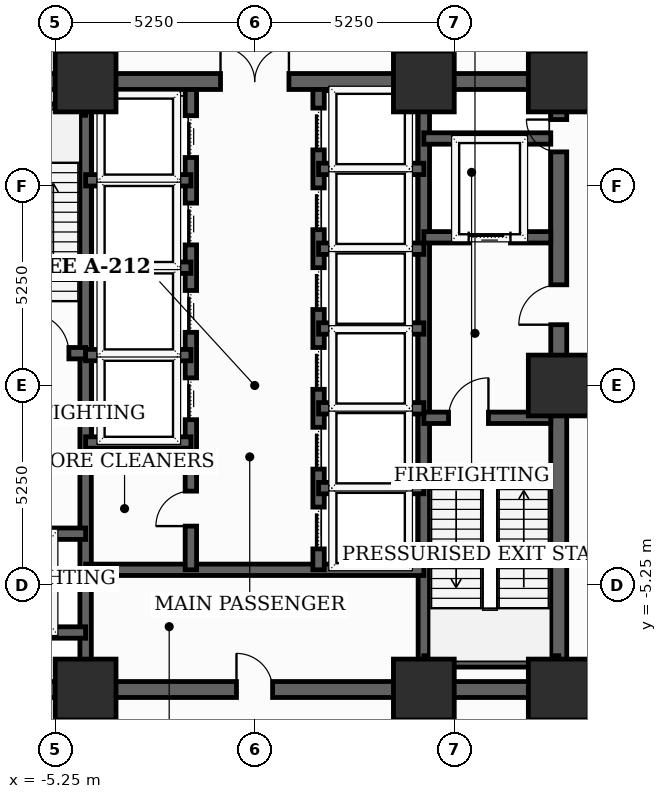
"""IFC4 building model, lengths in metres.
Left out: names, types, materials, properties, quantities, classifications, styles, units other than length and angle.
Written with IfcOpenShell. Run it as: python <this file> out.ifc"""

import sys

from ifc_helpers import new_model, si_unit, direction, frame, frame_2d, origin, origin_2d, place, context, subcontext, project, spatial, rectangle, extrude, element, fill, save


model = new_model("IFC4")
c1 = context("Model", 3, precision=1e-05, world=origin(), true_north=direction((0.0, 1.0)))
c2 = subcontext(c1, "Body", "Model", "MODEL_VIEW")
j1 = project(units=[si_unit("LENGTHUNIT", "METRE"), si_unit("PLANEANGLEUNIT", "RADIAN")], contexts=[c1])
p1 = place(None, origin())
s1 = spatial("IfcSite", under=j1, at=p1, CompositionType="ELEMENT")
p2 = place(p1, origin())
s2 = spatial("IfcBuilding", under=s1, at=p2, CompositionType="ELEMENT")
p3 = place(p2, frame((0.0, 0.0, 20.8)))
s3 = spatial("IfcBuildingStorey", under=s2, at=p3, CompositionType="ELEMENT", Elevation=20.8)
for number, where, z_axis, x_axis in (
    (1, (-4.45, -8.0, 0.0), (0.0, 0.0, 1.0), (1.0, 0.0, 0.0)),
    (2, (4.45, -8.0, 0.0), (0.0, 0.0, 1.0), (1.0, 0.0, 0.0)),
    (3, (8.0, -8.0, 0.0), (0.0, 0.0, 1.0), (1.0, 0.0, 0.0)),
    (4, (8.0, 0.0, 0.0), (0.0, 0.0, 1.0), (1.0, 0.0, 0.0)),
    (5, (8.0, 8.0, 0.0), (0.0, 0.0, 1.0), (1.0, 0.0, 0.0)),
    (6, (4.45, 8.0, 0.0), (0.0, 0.0, 1.0), (1.0, 0.0, 0.0)),
    (7, (-4.45, 8.0, 0.0), (0.0, 0.0, 1.0), (1.0, 0.0, 0.0)),
):
    element("IfcColumn", number, at=place(p3, frame(where, z_axis=z_axis, x_axis=x_axis)), inside=s3, PredefinedType="COLUMN", context=c2, shape_type="SweptSolid", body=[
        extrude(rectangle(XDim=1.6, YDim=1.6, at=origin_2d()), origin(), (0.0, 0.0, 1.0), 5.2),
    ])
p4 = place(p3, frame((8.0, -8.0, 0.0), z_axis=(0.0, 0.0, 1.0), x_axis=(0.0, 1.0, 0.0)))
e8 = element("IfcWall", 8, at=p4, inside=s3, PredefinedType="SHEAR", context=c2, shape_type="SweptSolid", body=[
    extrude(rectangle(XDim=16.0, YDim=0.42, at=frame_2d((8.0, 0.0))), origin(), (0.0, 0.0, 1.0), 4.94),
])
p5 = place(p4, frame((9.6, 0.0, 0.0)))
e9 = element("IfcOpeningElement", 9, at=p5, cuts=e8, PredefinedType="OPENING", context=c2, shape_type="SweptSolid", body=[
    extrude(rectangle(XDim=1.05, YDim=2.15, at=frame_2d((0.525, 1.075))), frame((0.0, 0.22, 0.0), z_axis=(0.0, -1.0, 0.0), x_axis=(1.0, 0.0, 0.0)), (0.0, 0.0, 1.0), 0.44),
])
p6 = place(p4, frame((14.148, 0.0, 0.0)))
e10 = element("IfcOpeningElement", 10, at=p6, cuts=e8, PredefinedType="OPENING", context=c2, shape_type="SweptSolid", body=[
    extrude(rectangle(XDim=0.85, YDim=2.02, at=frame_2d((0.425, 1.01))), frame((0.0, 0.22, 0.0), z_axis=(0.0, -1.0, 0.0), x_axis=(1.0, 0.0, 0.0)), (0.0, 0.0, 1.0), 0.44),
])
p7 = place(p3, frame((-8.0, -8.0, 0.0), z_axis=(0.0, 0.0, 1.0), x_axis=(1.0, 0.0, 0.0)))
e11 = element("IfcWall", 11, at=p7, inside=s3, PredefinedType="SHEAR", context=c2, shape_type="SweptSolid", body=[
    extrude(rectangle(XDim=16.0, YDim=0.42, at=frame_2d((8.0, 0.0))), origin(), (0.0, 0.0, 1.0), 4.94),
])
p8 = place(p7, frame((7.52, 0.0, 0.0)))
e12 = element("IfcOpeningElement", 12, at=p8, cuts=e11, PredefinedType="OPENING", context=c2, shape_type="SweptSolid", body=[
    extrude(rectangle(XDim=0.95, YDim=2.1, at=frame_2d((0.475, 1.05))), frame((0.0, 0.22, 0.0), z_axis=(0.0, -1.0, 0.0), x_axis=(1.0, 0.0, 0.0)), (0.0, 0.0, 1.0), 0.44),
])
p9 = place(p3, frame((-8.0, 8.0, 0.0), z_axis=(0.0, 0.0, 1.0), x_axis=(1.0, 0.0, 0.0)))
e13 = element("IfcWall", 13, at=p9, inside=s3, PredefinedType="SHEAR", context=c2, shape_type="SweptSolid", body=[
    extrude(rectangle(XDim=16.0, YDim=0.42, at=frame_2d((8.0, 0.0))), origin(), (0.0, 0.0, 1.0), 4.94),
])
p10 = place(p9, frame((7.1, 0.0, 0.0)))
e14 = element("IfcOpeningElement", 14, at=p10, cuts=e13, PredefinedType="OPENING", context=c2, shape_type="SweptSolid", body=[
    extrude(rectangle(XDim=1.8, YDim=2.15, at=frame_2d((0.9, 1.075))), frame((0.0, 0.22, 0.0), z_axis=(0.0, -1.0, 0.0), x_axis=(1.0, 0.0, 0.0)), (0.0, 0.0, 1.0), 0.44),
])
for number, where, z_axis, x_axis in (
    (15, (-4.45, -7.79, 0.0), (0.0, 0.0, 1.0), (0.0, 1.0, 0.0)),
    (16, (4.45, -7.79, 0.0), (0.0, 0.0, 1.0), (0.0, 1.0, 0.0)),
):
    element("IfcWall", number, at=place(p3, frame(where, z_axis=z_axis, x_axis=x_axis)), inside=s3, PredefinedType="SHEAR", context=c2, shape_type="SweptSolid", body=[
        extrude(rectangle(XDim=15.58, YDim=0.3, at=frame_2d((7.79, 0.0))), origin(), (0.0, 0.0, 1.0), 4.94),
    ])
p11 = place(p3, frame((-7.79, 0.85, 0.0), z_axis=(0.0, 0.0, 1.0), x_axis=(1.0, 0.0, 0.0)))
e17 = element("IfcWall", 17, at=p11, inside=s3, PredefinedType="SHEAR", context=c2, shape_type="SweptSolid", body=[
    extrude(rectangle(XDim=3.34, YDim=0.3, at=frame_2d((1.67, 0.0))), origin(), (0.0, 0.0, 1.0), 4.94),
])
p12 = place(p11, frame((1.85, 0.0, 0.0)))
e18 = element("IfcOpeningElement", 18, at=p12, cuts=e17, PredefinedType="OPENING", context=c2, shape_type="SweptSolid", body=[
    extrude(rectangle(XDim=1.05, YDim=2.15, at=frame_2d((0.525, 1.075))), frame((0.0, 0.16, 0.0), z_axis=(0.0, -1.0, 0.0), x_axis=(1.0, 0.0, 0.0)), (0.0, 0.0, 1.0), 0.32),
])
p13 = place(p3, frame((-7.79, 7.26, 0.0), z_axis=(0.0, 0.0, 1.0), x_axis=(1.0, 0.0, 0.0)))
e19 = element("IfcWall", 19, at=p13, inside=s3, PredefinedType="SHEAR", context=c2, shape_type="SweptSolid", body=[
    extrude(rectangle(XDim=3.34, YDim=0.3, at=frame_2d((1.67, 0.0))), origin(), (0.0, 0.0, 1.0), 4.94),
])
p14 = place(p3, frame((4.45, -0.85, 0.0), z_axis=(0.0, 0.0, 1.0), x_axis=(1.0, 0.0, 0.0)))
e20 = element("IfcWall", 20, at=p14, inside=s3, PredefinedType="SHEAR", context=c2, shape_type="SweptSolid", body=[
    extrude(rectangle(XDim=3.34, YDim=0.3, at=frame_2d((1.67, 0.0))), origin(), (0.0, 0.0, 1.0), 4.94),
])
p15 = place(p14, frame((0.65, 0.0, 0.0)))
e21 = element("IfcOpeningElement", 21, at=p15, cuts=e20, PredefinedType="OPENING", context=c2, shape_type="SweptSolid", body=[
    extrude(rectangle(XDim=1.05, YDim=2.15, at=frame_2d((0.525, 1.075))), frame((0.0, 0.16, 0.0), z_axis=(0.0, -1.0, 0.0), x_axis=(1.0, 0.0, 0.0)), (0.0, 0.0, 1.0), 0.32),
])
p16 = place(p3, frame((4.45, -7.26, 0.0), z_axis=(0.0, 0.0, 1.0), x_axis=(1.0, 0.0, 0.0)))
e22 = element("IfcWall", 22, at=p16, inside=s3, PredefinedType="SHEAR", context=c2, shape_type="SweptSolid", body=[
    extrude(rectangle(XDim=3.55, YDim=0.3, at=frame_2d((1.775, 0.0))), origin(), (0.0, 0.0, 1.0), 4.94),
])
p17 = place(p3, frame((-7.79, -3.9, 0.0), z_axis=(0.0, 0.0, 1.0), x_axis=(1.0, 0.0, 0.0)))
e23 = element("IfcWall", 23, at=p17, inside=s3, PredefinedType="SHEAR", context=c2, shape_type="SweptSolid", body=[
    extrude(rectangle(XDim=3.34, YDim=0.3, at=frame_2d((1.67, 0.0))), origin(), (0.0, 0.0, 1.0), 4.94),
])
p18 = place(p17, frame((1.27, 0.0, 0.0)))
e24 = element("IfcOpeningElement", 24, at=p18, cuts=e23, PredefinedType="OPENING", context=c2, shape_type="SweptSolid", body=[
    extrude(rectangle(XDim=1.1, YDim=2.1, at=frame_2d((0.55, 1.05))), frame((0.0, 0.16, 0.0), z_axis=(0.0, -1.0, 0.0), x_axis=(1.0, 0.0, 0.0)), (0.0, 0.0, 1.0), 0.32),
])
p19 = place(p3, frame((-7.79, -6.5, 0.0), z_axis=(0.0, 0.0, 1.0), x_axis=(1.0, 0.0, 0.0)))
e25 = element("IfcWall", 25, at=p19, inside=s3, PredefinedType="SHEAR", context=c2, shape_type="SweptSolid", body=[
    extrude(rectangle(XDim=3.34, YDim=0.3, at=frame_2d((1.67, 0.0))), origin(), (0.0, 0.0, 1.0), 4.94),
])
p20 = place(p3, frame((4.45, 3.9, 0.0), z_axis=(0.0, 0.0, 1.0), x_axis=(1.0, 0.0, 0.0)))
e26 = element("IfcWall", 26, at=p20, inside=s3, PredefinedType="SHEAR", context=c2, shape_type="SweptSolid", body=[
    extrude(rectangle(XDim=3.34, YDim=0.3, at=frame_2d((1.67, 0.0))), origin(), (0.0, 0.0, 1.0), 4.94),
])
p21 = place(p20, frame((1.18, 0.0, 0.0)))
e27 = element("IfcOpeningElement", 27, at=p21, cuts=e26, PredefinedType="OPENING", context=c2, shape_type="SweptSolid", body=[
    extrude(rectangle(XDim=1.1, YDim=2.1, at=frame_2d((0.55, 1.05))), frame((0.0, 0.16, 0.0), z_axis=(0.0, -1.0, 0.0), x_axis=(1.0, 0.0, 0.0)), (0.0, 0.0, 1.0), 0.32),
])
p22 = place(p3, frame((4.45, 6.5, 0.0), z_axis=(0.0, 0.0, 1.0), x_axis=(1.0, 0.0, 0.0)))
e28 = element("IfcWall", 28, at=p22, inside=s3, PredefinedType="SHEAR", context=c2, shape_type="SweptSolid", body=[
    extrude(rectangle(XDim=3.34, YDim=0.3, at=frame_2d((1.67, 0.0))), origin(), (0.0, 0.0, 1.0), 4.94),
])
p23 = place(p3, frame((-4.45, -4.85, 0.0), z_axis=(0.0, 0.0, 1.0), x_axis=(1.0, 0.0, 0.0)))
e29 = element("IfcWall", 29, at=p23, inside=s3, PredefinedType="SHEAR", context=c2, shape_type="SweptSolid", body=[
    extrude(rectangle(XDim=8.9, YDim=0.3, at=frame_2d((4.45, 0.0))), origin(), (0.0, 0.0, 1.0), 4.94),
])
p24 = place(p3, frame((-1.68, -4.85, 0.0), z_axis=(0.0, 0.0, 1.0), x_axis=(0.0, 1.0, 0.0)))
e30 = element("IfcWall", 30, at=p24, inside=s3, PredefinedType="SHEAR", context=c2, shape_type="SweptSolid", body=[
    extrude(rectangle(XDim=12.64, YDim=0.3, at=frame_2d((6.32, 0.0))), origin(), (0.0, 0.0, 1.0), 4.94),
])
p25 = place(p24, frame((3.95, 0.0, 0.0)))
e31 = element("IfcOpeningElement", 31, at=p25, cuts=e30, PredefinedType="OPENING", context=c2, shape_type="SweptSolid", body=[
    extrude(rectangle(XDim=1.1, YDim=2.1, at=frame_2d((0.55, 1.05))), frame((0.0, 0.16, 0.0), z_axis=(0.0, -1.0, 0.0), x_axis=(1.0, 0.0, 0.0)), (0.0, 0.0, 1.0), 0.32),
])
p26 = place(p24, frame((6.25, 0.0, 0.0)))
e32 = element("IfcOpeningElement", 32, at=p26, cuts=e30, PredefinedType="OPENING", context=c2, shape_type="SweptSolid", body=[
    extrude(rectangle(XDim=1.1, YDim=2.1, at=frame_2d((0.55, 1.05))), frame((0.0, 0.16, 0.0), z_axis=(0.0, -1.0, 0.0), x_axis=(1.0, 0.0, 0.0)), (0.0, 0.0, 1.0), 0.32),
])
p27 = place(p24, frame((8.55, 0.0, 0.0)))
e33 = element("IfcOpeningElement", 33, at=p27, cuts=e30, PredefinedType="OPENING", context=c2, shape_type="SweptSolid", body=[
    extrude(rectangle(XDim=1.1, YDim=2.1, at=frame_2d((0.55, 1.05))), frame((0.0, 0.16, 0.0), z_axis=(0.0, -1.0, 0.0), x_axis=(1.0, 0.0, 0.0)), (0.0, 0.0, 1.0), 0.32),
])
p28 = place(p24, frame((10.85, 0.0, 0.0)))
e34 = element("IfcOpeningElement", 34, at=p28, cuts=e30, PredefinedType="OPENING", context=c2, shape_type="SweptSolid", body=[
    extrude(rectangle(XDim=1.1, YDim=2.1, at=frame_2d((0.55, 1.05))), frame((0.0, 0.16, 0.0), z_axis=(0.0, -1.0, 0.0), x_axis=(1.0, 0.0, 0.0)), (0.0, 0.0, 1.0), 0.32),
])
p29 = place(p24, frame((1.15, 0.0, 0.0)))
e35 = element("IfcOpeningElement", 35, at=p29, cuts=e30, PredefinedType="OPENING", context=c2, shape_type="SweptSolid", body=[
    extrude(rectangle(XDim=0.92, YDim=2.1, at=frame_2d((0.46, 1.05))), frame((0.0, 0.16, 0.0), z_axis=(0.0, -1.0, 0.0), x_axis=(1.0, 0.0, 0.0)), (0.0, 0.0, 1.0), 0.32),
])
p30 = place(p3, frame((1.68, -4.85, 0.0), z_axis=(0.0, 0.0, 1.0), x_axis=(0.0, 1.0, 0.0)))
e36 = element("IfcWall", 36, at=p30, inside=s3, PredefinedType="SHEAR", context=c2, shape_type="SweptSolid", body=[
    extrude(rectangle(XDim=12.64, YDim=0.3, at=frame_2d((6.32, 0.0))), origin(), (0.0, 0.0, 1.0), 4.94),
])
p31 = place(p30, frame((0.55, 0.0, 0.0)))
e37 = element("IfcOpeningElement", 37, at=p31, cuts=e36, PredefinedType="OPENING", context=c2, shape_type="SweptSolid", body=[
    extrude(rectangle(XDim=1.1, YDim=2.1, at=frame_2d((0.55, 1.05))), frame((0.0, 0.16, 0.0), z_axis=(0.0, -1.0, 0.0), x_axis=(1.0, 0.0, 0.0)), (0.0, 0.0, 1.0), 0.32),
])
p32 = place(p30, frame((2.65, 0.0, 0.0)))
e38 = element("IfcOpeningElement", 38, at=p32, cuts=e36, PredefinedType="OPENING", context=c2, shape_type="SweptSolid", body=[
    extrude(rectangle(XDim=1.1, YDim=2.1, at=frame_2d((0.55, 1.05))), frame((0.0, 0.16, 0.0), z_axis=(0.0, -1.0, 0.0), x_axis=(1.0, 0.0, 0.0)), (0.0, 0.0, 1.0), 0.32),
])
p33 = place(p30, frame((4.75, 0.0, 0.0)))
e39 = element("IfcOpeningElement", 39, at=p33, cuts=e36, PredefinedType="OPENING", context=c2, shape_type="SweptSolid", body=[
    extrude(rectangle(XDim=1.1, YDim=2.1, at=frame_2d((0.55, 1.05))), frame((0.0, 0.16, 0.0), z_axis=(0.0, -1.0, 0.0), x_axis=(1.0, 0.0, 0.0)), (0.0, 0.0, 1.0), 0.32),
])
p34 = place(p30, frame((6.85, 0.0, 0.0)))
e40 = element("IfcOpeningElement", 40, at=p34, cuts=e36, PredefinedType="OPENING", context=c2, shape_type="SweptSolid", body=[
    extrude(rectangle(XDim=1.1, YDim=2.1, at=frame_2d((0.55, 1.05))), frame((0.0, 0.16, 0.0), z_axis=(0.0, -1.0, 0.0), x_axis=(1.0, 0.0, 0.0)), (0.0, 0.0, 1.0), 0.32),
])
p35 = place(p30, frame((8.95, 0.0, 0.0)))
e41 = element("IfcOpeningElement", 41, at=p35, cuts=e36, PredefinedType="OPENING", context=c2, shape_type="SweptSolid", body=[
    extrude(rectangle(XDim=1.1, YDim=2.1, at=frame_2d((0.55, 1.05))), frame((0.0, 0.16, 0.0), z_axis=(0.0, -1.0, 0.0), x_axis=(1.0, 0.0, 0.0)), (0.0, 0.0, 1.0), 0.32),
])
p36 = place(p30, frame((11.05, 0.0, 0.0)))
e42 = element("IfcOpeningElement", 42, at=p36, cuts=e36, PredefinedType="OPENING", context=c2, shape_type="SweptSolid", body=[
    extrude(rectangle(XDim=1.1, YDim=2.1, at=frame_2d((0.55, 1.05))), frame((0.0, 0.16, 0.0), z_axis=(0.0, -1.0, 0.0), x_axis=(1.0, 0.0, 0.0)), (0.0, 0.0, 1.0), 0.32),
])
for number, where, z_axis, x_axis in (
    (43, (-4.45, -1.5, 0.0), (0.0, 0.0, 1.0), (1.0, 0.0, 0.0)),
    (44, (-4.45, 0.8, 0.0), (0.0, 0.0, 1.0), (1.0, 0.0, 0.0)),
    (45, (-4.45, 3.1, 0.0), (0.0, 0.0, 1.0), (1.0, 0.0, 0.0)),
    (46, (-4.45, 5.4, 0.0), (0.0, 0.0, 1.0), (1.0, 0.0, 0.0)),
    (47, (1.68, 1.5, 0.0), (0.0, 0.0, 1.0), (1.0, 0.0, 0.0)),
    (48, (1.68, 3.6, 0.0), (0.0, 0.0, 1.0), (1.0, 0.0, 0.0)),
    (49, (1.68, 5.7, 0.0), (0.0, 0.0, 1.0), (1.0, 0.0, 0.0)),
    (50, (1.68, -2.7, 0.0), (0.0, 0.0, 1.0), (1.0, 0.0, 0.0)),
    (51, (1.68, -0.6, 0.0), (0.0, 0.0, 1.0), (1.0, 0.0, 0.0)),
):
    element("IfcWall", number, at=place(p3, frame(where, z_axis=z_axis, x_axis=x_axis)), inside=s3, PredefinedType="SHEAR", context=c2, shape_type="SweptSolid", body=[
        extrude(rectangle(XDim=2.77, YDim=0.3, at=frame_2d((1.385, 0.0))), origin(), (0.0, 0.0, 1.0), 4.94),
    ])
p37 = place(p5, origin())
e52 = element("IfcDoor", 52, at=p37, inside=s3, OperationType="SINGLE_SWING_LEFT", PredefinedType="DOOR", context=c2, shape_type="SweptSolid", body=[
    extrude(rectangle(XDim=1.05, YDim=2.15, at=frame_2d((0.525, 1.075))), frame((0.0, 0.025, 0.0), z_axis=(0.0, -1.0, 0.0), x_axis=(1.0, 0.0, 0.0)), (0.0, 0.0, 1.0), 0.05),
])
fill(e9, e52)
p38 = place(p6, origin())
e53 = element("IfcDoor", 53, at=p38, inside=s3, OperationType="SINGLE_SWING_RIGHT", PredefinedType="TRAPDOOR", context=c2, shape_type="SweptSolid", body=[
    extrude(rectangle(XDim=0.85, YDim=2.02, at=frame_2d((0.425, 1.01))), frame((0.0, 0.025, 0.0), z_axis=(0.0, -1.0, 0.0), x_axis=(1.0, 0.0, 0.0)), (0.0, 0.0, 1.0), 0.05),
])
fill(e10, e53)
p39 = place(p8, origin())
e54 = element("IfcDoor", 54, at=p39, inside=s3, OperationType="SINGLE_SWING_LEFT", PredefinedType="DOOR", context=c2, shape_type="SweptSolid", body=[
    extrude(rectangle(XDim=0.95, YDim=2.1, at=frame_2d((0.475, 1.05))), frame((0.0, 0.025, 0.0), z_axis=(0.0, -1.0, 0.0), x_axis=(1.0, 0.0, 0.0)), (0.0, 0.0, 1.0), 0.05),
])
fill(e12, e54)
p40 = place(p10, origin())
e55 = element("IfcDoor", 55, at=p40, inside=s3, OperationType="DOUBLE_DOOR_SINGLE_SWING", PredefinedType="DOOR", context=c2, shape_type="SweptSolid", body=[
    extrude(rectangle(XDim=1.8, YDim=2.15, at=frame_2d((0.9, 1.075))), frame((0.0, 0.025, 0.0), z_axis=(0.0, -1.0, 0.0), x_axis=(1.0, 0.0, 0.0)), (0.0, 0.0, 1.0), 0.05),
])
fill(e14, e55)
p41 = place(p12, origin())
e56 = element("IfcDoor", 56, at=p41, inside=s3, OperationType="SINGLE_SWING_LEFT", PredefinedType="DOOR", context=c2, shape_type="SweptSolid", body=[
    extrude(rectangle(XDim=1.05, YDim=2.15, at=frame_2d((0.525, 1.075))), frame((0.0, 0.025, 0.0), z_axis=(0.0, -1.0, 0.0), x_axis=(1.0, 0.0, 0.0)), (0.0, 0.0, 1.0), 0.05),
])
fill(e18, e56)
p42 = place(p15, origin())
e57 = element("IfcDoor", 57, at=p42, inside=s3, OperationType="SINGLE_SWING_RIGHT", PredefinedType="DOOR", context=c2, shape_type="SweptSolid", body=[
    extrude(rectangle(XDim=1.05, YDim=2.15, at=frame_2d((0.525, 1.075))), frame((0.0, 0.025, 0.0), z_axis=(0.0, -1.0, 0.0), x_axis=(1.0, 0.0, 0.0)), (0.0, 0.0, 1.0), 0.05),
])
fill(e21, e57)
p43 = place(p21, origin())
e58 = element("IfcDoor", 58, at=p43, inside=s3, OperationType="SLIDING_TO_LEFT", PredefinedType="DOOR", context=c2, shape_type="SweptSolid", body=[
    extrude(rectangle(XDim=1.1, YDim=2.1, at=frame_2d((0.55, 1.05))), frame((0.0, 0.025, 0.0), z_axis=(0.0, -1.0, 0.0), x_axis=(1.0, 0.0, 0.0)), (0.0, 0.0, 1.0), 0.05),
])
fill(e27, e58)
p44 = place(p25, origin())
e59 = element("IfcDoor", 59, at=p44, inside=s3, OperationType="SLIDING_TO_LEFT", PredefinedType="DOOR", context=c2, shape_type="SweptSolid", body=[
    extrude(rectangle(XDim=1.1, YDim=2.1, at=frame_2d((0.55, 1.05))), frame((0.0, 0.025, 0.0), z_axis=(0.0, -1.0, 0.0), x_axis=(1.0, 0.0, 0.0)), (0.0, 0.0, 1.0), 0.05),
])
fill(e31, e59)
p45 = place(p26, origin())
e60 = element("IfcDoor", 60, at=p45, inside=s3, OperationType="SLIDING_TO_LEFT", PredefinedType="DOOR", context=c2, shape_type="SweptSolid", body=[
    extrude(rectangle(XDim=1.1, YDim=2.1, at=frame_2d((0.55, 1.05))), frame((0.0, 0.025, 0.0), z_axis=(0.0, -1.0, 0.0), x_axis=(1.0, 0.0, 0.0)), (0.0, 0.0, 1.0), 0.05),
])
fill(e32, e60)
p46 = place(p27, origin())
e61 = element("IfcDoor", 61, at=p46, inside=s3, OperationType="SLIDING_TO_LEFT", PredefinedType="DOOR", context=c2, shape_type="SweptSolid", body=[
    extrude(rectangle(XDim=1.1, YDim=2.1, at=frame_2d((0.55, 1.05))), frame((0.0, 0.025, 0.0), z_axis=(0.0, -1.0, 0.0), x_axis=(1.0, 0.0, 0.0)), (0.0, 0.0, 1.0), 0.05),
])
fill(e33, e61)
p47 = place(p28, origin())
e62 = element("IfcDoor", 62, at=p47, inside=s3, OperationType="SLIDING_TO_LEFT", PredefinedType="DOOR", context=c2, shape_type="SweptSolid", body=[
    extrude(rectangle(XDim=1.1, YDim=2.1, at=frame_2d((0.55, 1.05))), frame((0.0, 0.025, 0.0), z_axis=(0.0, -1.0, 0.0), x_axis=(1.0, 0.0, 0.0)), (0.0, 0.0, 1.0), 0.05),
])
fill(e34, e62)
p48 = place(p29, origin())
e63 = element("IfcDoor", 63, at=p48, inside=s3, OperationType="SINGLE_SWING_LEFT", PredefinedType="DOOR", context=c2, shape_type="SweptSolid", body=[
    extrude(rectangle(XDim=0.92, YDim=2.1, at=frame_2d((0.46, 1.05))), frame((0.0, 0.025, 0.0), z_axis=(0.0, -1.0, 0.0), x_axis=(1.0, 0.0, 0.0)), (0.0, 0.0, 1.0), 0.05),
])
fill(e35, e63)
p49 = place(p31, origin())
e64 = element("IfcDoor", 64, at=p49, inside=s3, OperationType="SLIDING_TO_LEFT", PredefinedType="DOOR", context=c2, shape_type="SweptSolid", body=[
    extrude(rectangle(XDim=1.1, YDim=2.1, at=frame_2d((0.55, 1.05))), frame((0.0, 0.025, 0.0), z_axis=(0.0, -1.0, 0.0), x_axis=(1.0, 0.0, 0.0)), (0.0, 0.0, 1.0), 0.05),
])
fill(e37, e64)
p50 = place(p32, origin())
e65 = element("IfcDoor", 65, at=p50, inside=s3, OperationType="SLIDING_TO_LEFT", PredefinedType="DOOR", context=c2, shape_type="SweptSolid", body=[
    extrude(rectangle(XDim=1.1, YDim=2.1, at=frame_2d((0.55, 1.05))), frame((0.0, 0.025, 0.0), z_axis=(0.0, -1.0, 0.0), x_axis=(1.0, 0.0, 0.0)), (0.0, 0.0, 1.0), 0.05),
])
fill(e38, e65)
p51 = place(p33, origin())
e66 = element("IfcDoor", 66, at=p51, inside=s3, OperationType="SLIDING_TO_LEFT", PredefinedType="DOOR", context=c2, shape_type="SweptSolid", body=[
    extrude(rectangle(XDim=1.1, YDim=2.1, at=frame_2d((0.55, 1.05))), frame((0.0, 0.025, 0.0), z_axis=(0.0, -1.0, 0.0), x_axis=(1.0, 0.0, 0.0)), (0.0, 0.0, 1.0), 0.05),
])
fill(e39, e66)
p52 = place(p34, origin())
e67 = element("IfcDoor", 67, at=p52, inside=s3, OperationType="SLIDING_TO_LEFT", PredefinedType="DOOR", context=c2, shape_type="SweptSolid", body=[
    extrude(rectangle(XDim=1.1, YDim=2.1, at=frame_2d((0.55, 1.05))), frame((0.0, 0.025, 0.0), z_axis=(0.0, -1.0, 0.0), x_axis=(1.0, 0.0, 0.0)), (0.0, 0.0, 1.0), 0.05),
])
fill(e40, e67)
p53 = place(p35, origin())
e68 = element("IfcDoor", 68, at=p53, inside=s3, OperationType="SLIDING_TO_LEFT", PredefinedType="DOOR", context=c2, shape_type="SweptSolid", body=[
    extrude(rectangle(XDim=1.1, YDim=2.1, at=frame_2d((0.55, 1.05))), frame((0.0, 0.025, 0.0), z_axis=(0.0, -1.0, 0.0), x_axis=(1.0, 0.0, 0.0)), (0.0, 0.0, 1.0), 0.05),
])
fill(e41, e68)
p54 = place(p36, origin())
e69 = element("IfcDoor", 69, at=p54, inside=s3, OperationType="SLIDING_TO_LEFT", PredefinedType="DOOR", context=c2, shape_type="SweptSolid", body=[
    extrude(rectangle(XDim=1.1, YDim=2.1, at=frame_2d((0.55, 1.05))), frame((0.0, 0.025, 0.0), z_axis=(0.0, -1.0, 0.0), x_axis=(1.0, 0.0, 0.0)), (0.0, 0.0, 1.0), 0.05),
])
fill(e42, e69)
save(model, sys.argv[1])
